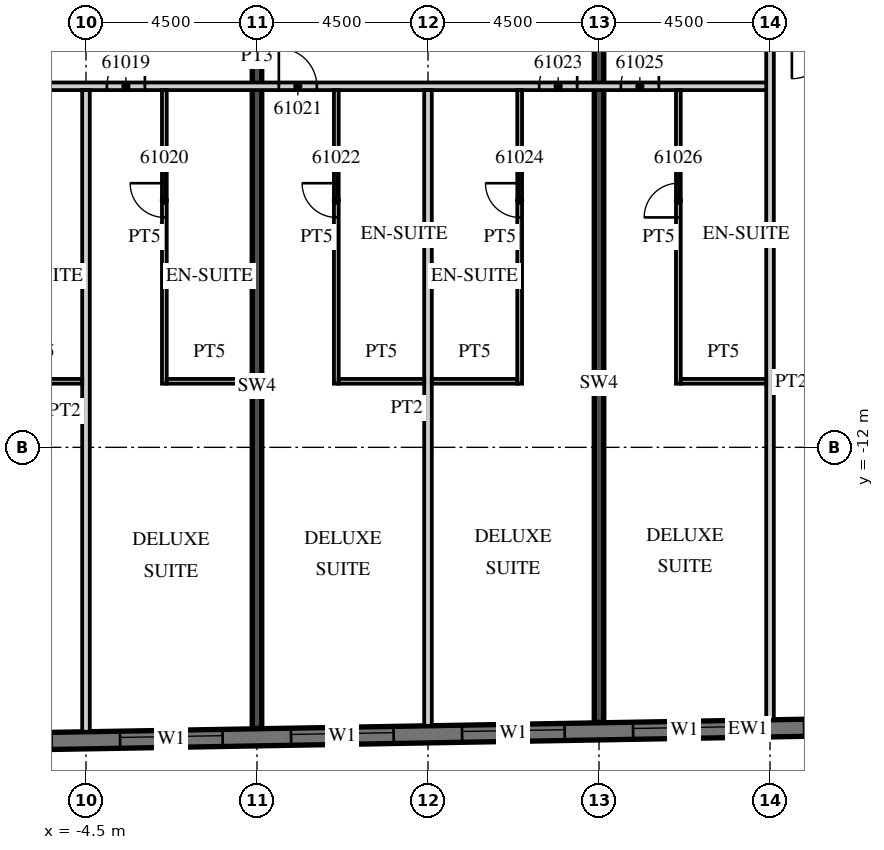
"""IFC4 building model, lengths in metres.
Left out: names, types, materials, properties, quantities, classifications, styles, units other than length and angle.
Written with IfcOpenShell. Run it as: python <this file> out.ifc"""

import sys

from ifc_helpers import new_model, si_unit, direction, frame, frame_2d, origin, place, context, subcontext, project, spatial, rectangle, extrude, element, fill, save


model = new_model("IFC4")
c1 = context("Model", 3, precision=1e-05, world=origin(), true_north=direction((0.0, 1.0)))
c2 = subcontext(c1, "Body", "Model", "MODEL_VIEW")
j1 = project(units=[si_unit("LENGTHUNIT", "METRE"), si_unit("PLANEANGLEUNIT", "RADIAN")], contexts=[c1])
p1 = place(None, origin())
s1 = spatial("IfcSite", under=j1, at=p1, CompositionType="ELEMENT")
p2 = place(p1, origin())
s2 = spatial("IfcBuilding", under=s1, at=p2, CompositionType="ELEMENT")
p3 = place(p2, frame((0.0, 0.0, 247.4)))
s3 = spatial("IfcBuildingStorey", under=s2, at=p3, CompositionType="ELEMENT", Elevation=247.4)
p4 = place(p3, frame((0.0, -19.393, 0.0), z_axis=(0.0, 0.0, 1.0), x_axis=(0.0, 1.0, 0.0)))
e1 = element("IfcWall", 1, at=p4, inside=s3, PredefinedType="SHEAR", context=c2, shape_type="SweptSolid", body=[
    extrude(rectangle(XDim=17.993, YDim=0.25, at=frame_2d((8.997, 0.0))), origin(), (0.0, 0.0, 1.0), 3.3),
])
p5 = place(p3, frame((9.0, -19.236, 0.0), z_axis=(0.0, 0.0, 1.0), x_axis=(0.0, 1.0, 0.0)))
e2 = element("IfcWall", 2, at=p5, inside=s3, PredefinedType="SHEAR", context=c2, shape_type="SweptSolid", body=[
    extrude(rectangle(XDim=17.836, YDim=0.25, at=frame_2d((8.918, 0.0))), origin(), (0.0, 0.0, 1.0), 3.3),
])
p6 = place(p3, frame((-13.504, -19.866, 0.0), z_axis=(0.0, 0.0, 1.0), x_axis=(0.999847672978, 0.017453676992, 0.0)))
e3 = element("IfcWall", 3, at=p6, inside=s3, PredefinedType="SOLIDWALL", context=c2, shape_type="SweptSolid", body=[
    extrude(rectangle(XDim=52.86, YDim=0.45, at=frame_2d((26.43, 0.0))), origin(), (0.0, 0.0, 1.0), 3.02),
])
p7 = place(p6, frame((0.9, 0.0, 0.45)))
e4 = element("IfcOpeningElement", 4, at=p7, cuts=e3, PredefinedType="OPENING", context=c2, shape_type="SweptSolid", body=[
    extrude(rectangle(XDim=2.7, YDim=2.25, at=frame_2d((1.35, 1.125))), frame((0.0, 0.235, 0.0), z_axis=(0.0, -1.0, 0.0), x_axis=(1.0, 0.0, 0.0)), (0.0, 0.0, 1.0), 0.47),
])
p8 = place(p6, frame((5.401, 0.0, 0.45)))
e5 = element("IfcOpeningElement", 5, at=p8, cuts=e3, PredefinedType="OPENING", context=c2, shape_type="SweptSolid", body=[
    extrude(rectangle(XDim=2.7, YDim=2.25, at=frame_2d((1.35, 1.125))), frame((0.0, 0.235, 0.0), z_axis=(0.0, -1.0, 0.0), x_axis=(1.0, 0.0, 0.0)), (0.0, 0.0, 1.0), 0.47),
])
p9 = place(p6, frame((9.902, 0.0, 0.45)))
e6 = element("IfcOpeningElement", 6, at=p9, cuts=e3, PredefinedType="OPENING", context=c2, shape_type="SweptSolid", body=[
    extrude(rectangle(XDim=2.7, YDim=2.25, at=frame_2d((1.35, 1.125))), frame((0.0, 0.235, 0.0), z_axis=(0.0, -1.0, 0.0), x_axis=(1.0, 0.0, 0.0)), (0.0, 0.0, 1.0), 0.47),
])
p10 = place(p6, frame((14.402, 0.0, 0.45)))
e7 = element("IfcOpeningElement", 7, at=p10, cuts=e3, PredefinedType="OPENING", context=c2, shape_type="SweptSolid", body=[
    extrude(rectangle(XDim=2.7, YDim=2.25, at=frame_2d((1.35, 1.125))), frame((0.0, 0.235, 0.0), z_axis=(0.0, -1.0, 0.0), x_axis=(1.0, 0.0, 0.0)), (0.0, 0.0, 1.0), 0.47),
])
p11 = place(p6, frame((18.903, 0.0, 0.45)))
e8 = element("IfcOpeningElement", 8, at=p11, cuts=e3, PredefinedType="OPENING", context=c2, shape_type="SweptSolid", body=[
    extrude(rectangle(XDim=2.7, YDim=2.25, at=frame_2d((1.35, 1.125))), frame((0.0, 0.235, 0.0), z_axis=(0.0, -1.0, 0.0), x_axis=(1.0, 0.0, 0.0)), (0.0, 0.0, 1.0), 0.47),
])
p12 = place(p6, frame((23.404, 0.0, 0.45)))
e9 = element("IfcOpeningElement", 9, at=p12, cuts=e3, PredefinedType="OPENING", context=c2, shape_type="SweptSolid", body=[
    extrude(rectangle(XDim=2.7, YDim=2.25, at=frame_2d((1.35, 1.125))), frame((0.0, 0.235, 0.0), z_axis=(0.0, -1.0, 0.0), x_axis=(1.0, 0.0, 0.0)), (0.0, 0.0, 1.0), 0.47),
])
p13 = place(p6, frame((27.904, 0.0, 0.45)))
e10 = element("IfcOpeningElement", 10, at=p13, cuts=e3, PredefinedType="OPENING", context=c2, shape_type="SweptSolid", body=[
    extrude(rectangle(XDim=2.7, YDim=2.25, at=frame_2d((1.35, 1.125))), frame((0.0, 0.235, 0.0), z_axis=(0.0, -1.0, 0.0), x_axis=(1.0, 0.0, 0.0)), (0.0, 0.0, 1.0), 0.47),
])
p14 = place(p6, frame((32.405, 0.0, 0.45)))
e11 = element("IfcOpeningElement", 11, at=p14, cuts=e3, PredefinedType="OPENING", context=c2, shape_type="SweptSolid", body=[
    extrude(rectangle(XDim=2.7, YDim=2.25, at=frame_2d((1.35, 1.125))), frame((0.0, 0.235, 0.0), z_axis=(0.0, -1.0, 0.0), x_axis=(1.0, 0.0, 0.0)), (0.0, 0.0, 1.0), 0.47),
])
p15 = place(p6, frame((36.906, 0.0, 0.45)))
e12 = element("IfcOpeningElement", 12, at=p15, cuts=e3, PredefinedType="OPENING", context=c2, shape_type="SweptSolid", body=[
    extrude(rectangle(XDim=2.7, YDim=2.25, at=frame_2d((1.35, 1.125))), frame((0.0, 0.235, 0.0), z_axis=(0.0, -1.0, 0.0), x_axis=(1.0, 0.0, 0.0)), (0.0, 0.0, 1.0), 0.47),
])
p16 = place(p6, frame((41.406, 0.0, 0.45)))
e13 = element("IfcOpeningElement", 13, at=p16, cuts=e3, PredefinedType="OPENING", context=c2, shape_type="SweptSolid", body=[
    extrude(rectangle(XDim=2.7, YDim=2.25, at=frame_2d((1.35, 1.125))), frame((0.0, 0.235, 0.0), z_axis=(0.0, -1.0, 0.0), x_axis=(1.0, 0.0, 0.0)), (0.0, 0.0, 1.0), 0.47),
])
p17 = place(p6, frame((45.907, 0.0, 0.45)))
e14 = element("IfcOpeningElement", 14, at=p17, cuts=e3, PredefinedType="OPENING", context=c2, shape_type="SweptSolid", body=[
    extrude(rectangle(XDim=2.7, YDim=2.25, at=frame_2d((1.35, 1.125))), frame((0.0, 0.235, 0.0), z_axis=(0.0, -1.0, 0.0), x_axis=(1.0, 0.0, 0.0)), (0.0, 0.0, 1.0), 0.47),
])
p18 = place(p3, frame((-13.5, -2.5, 0.0), z_axis=(0.0, 0.0, 1.0), x_axis=(1.0, 0.0, 0.0)))
e15 = element("IfcWall", 15, at=p18, inside=s3, PredefinedType="PARTITIONING", context=c2, shape_type="SweptSolid", body=[
    extrude(rectangle(XDim=27.0, YDim=0.2, at=frame_2d((13.5, 0.0))), origin(), (0.0, 0.0, 1.0), 3.02),
])
p19 = place(p18, frame((2.925, 0.0, 0.0)))
e16 = element("IfcOpeningElement", 16, at=p19, cuts=e15, PredefinedType="OPENING", context=c2, shape_type="SweptSolid", body=[
    extrude(rectangle(XDim=1.0, YDim=2.1, at=frame_2d((0.5, 1.05))), frame((0.0, 0.11, 0.0), z_axis=(0.0, -1.0, 0.0), x_axis=(1.0, 0.0, 0.0)), (0.0, 0.0, 1.0), 0.22),
])
p20 = place(p18, frame((5.075, 0.0, 0.0)))
e17 = element("IfcOpeningElement", 17, at=p20, cuts=e15, PredefinedType="OPENING", context=c2, shape_type="SweptSolid", body=[
    extrude(rectangle(XDim=1.0, YDim=2.1, at=frame_2d((0.5, 1.05))), frame((0.0, 0.11, 0.0), z_axis=(0.0, -1.0, 0.0), x_axis=(1.0, 0.0, 0.0)), (0.0, 0.0, 1.0), 0.22),
])
p21 = place(p18, frame((9.55, 0.0, 0.0)))
e18 = element("IfcOpeningElement", 18, at=p21, cuts=e15, PredefinedType="OPENING", context=c2, shape_type="SweptSolid", body=[
    extrude(rectangle(XDim=1.0, YDim=2.1, at=frame_2d((0.5, 1.05))), frame((0.0, 0.11, 0.0), z_axis=(0.0, -1.0, 0.0), x_axis=(1.0, 0.0, 0.0)), (0.0, 0.0, 1.0), 0.22),
])
p22 = place(p18, frame((14.075, 0.0, 0.0)))
e19 = element("IfcOpeningElement", 19, at=p22, cuts=e15, PredefinedType="OPENING", context=c2, shape_type="SweptSolid", body=[
    extrude(rectangle(XDim=1.0, YDim=2.1, at=frame_2d((0.5, 1.05))), frame((0.0, 0.11, 0.0), z_axis=(0.0, -1.0, 0.0), x_axis=(1.0, 0.0, 0.0)), (0.0, 0.0, 1.0), 0.22),
])
p23 = place(p18, frame((20.925, 0.0, 0.0)))
e20 = element("IfcOpeningElement", 20, at=p23, cuts=e15, PredefinedType="OPENING", context=c2, shape_type="SweptSolid", body=[
    extrude(rectangle(XDim=1.0, YDim=2.1, at=frame_2d((0.5, 1.05))), frame((0.0, 0.11, 0.0), z_axis=(0.0, -1.0, 0.0), x_axis=(1.0, 0.0, 0.0)), (0.0, 0.0, 1.0), 0.22),
])
p24 = place(p18, frame((23.075, 0.0, 0.0)))
e21 = element("IfcOpeningElement", 21, at=p24, cuts=e15, PredefinedType="OPENING", context=c2, shape_type="SweptSolid", body=[
    extrude(rectangle(XDim=1.0, YDim=2.1, at=frame_2d((0.5, 1.05))), frame((0.0, 0.11, 0.0), z_axis=(0.0, -1.0, 0.0), x_axis=(1.0, 0.0, 0.0)), (0.0, 0.0, 1.0), 0.22),
])
p25 = place(p3, frame((-4.5, -19.484, 0.0), z_axis=(0.0, 0.0, 1.0), x_axis=(0.0, 1.0, 0.0)))
e22 = element("IfcWall", 22, at=p25, inside=s3, PredefinedType="PARTITIONING", context=c2, shape_type="SweptSolid", body=[
    extrude(rectangle(XDim=16.884, YDim=0.2, at=frame_2d((8.442, 0.0))), origin(), (0.0, 0.0, 1.0), 3.02),
])
p26 = place(p3, frame((-6.85, -10.262, 0.0), z_axis=(0.0, 0.0, 1.0), x_axis=(1.0, 0.0, 0.0)))
e23 = element("IfcWall", 23, at=p26, inside=s3, PredefinedType="PARTITIONING", context=c2, shape_type="SweptSolid", body=[
    extrude(rectangle(XDim=2.25, YDim=0.125, at=frame_2d((1.125, 0.0))), origin(), (0.0, 0.0, 1.0), 3.02),
])
p27 = place(p3, frame((-2.438, -10.325, 0.0), z_axis=(0.0, 0.0, 1.0), x_axis=(0.0, 1.0, 0.0)))
e24 = element("IfcWall", 24, at=p27, inside=s3, PredefinedType="PARTITIONING", context=c2, shape_type="SweptSolid", body=[
    extrude(rectangle(XDim=7.725, YDim=0.125, at=frame_2d((3.862, 0.0))), origin(), (0.0, 0.0, 1.0), 3.02),
])
p28 = place(p27, frame((4.375, 0.0, 0.0)))
e25 = element("IfcOpeningElement", 25, at=p28, cuts=e24, PredefinedType="OPENING", context=c2, shape_type="SweptSolid", body=[
    extrude(rectangle(XDim=0.9, YDim=2.1, at=frame_2d((0.45, 1.05))), frame((0.0, 0.073, 0.0), z_axis=(0.0, -1.0, 0.0), x_axis=(1.0, 0.0, 0.0)), (0.0, 0.0, 1.0), 0.145),
])
p29 = place(p3, frame((-2.375, -10.262, 0.0), z_axis=(0.0, 0.0, 1.0), x_axis=(1.0, 0.0, 0.0)))
e26 = element("IfcWall", 26, at=p29, inside=s3, PredefinedType="PARTITIONING", context=c2, shape_type="SweptSolid", body=[
    extrude(rectangle(XDim=2.25, YDim=0.125, at=frame_2d((1.125, 0.0))), origin(), (0.0, 0.0, 1.0), 3.02),
])
p30 = place(p3, frame((4.5, -19.327, 0.0), z_axis=(0.0, 0.0, 1.0), x_axis=(0.0, 1.0, 0.0)))
e27 = element("IfcWall", 27, at=p30, inside=s3, PredefinedType="PARTITIONING", context=c2, shape_type="SweptSolid", body=[
    extrude(rectangle(XDim=16.727, YDim=0.2, at=frame_2d((8.363, 0.0))), origin(), (0.0, 0.0, 1.0), 3.02),
])
p31 = place(p3, frame((2.087, -10.325, 0.0), z_axis=(0.0, 0.0, 1.0), x_axis=(0.0, 1.0, 0.0)))
e28 = element("IfcWall", 28, at=p31, inside=s3, PredefinedType="PARTITIONING", context=c2, shape_type="SweptSolid", body=[
    extrude(rectangle(XDim=7.725, YDim=0.125, at=frame_2d((3.862, 0.0))), origin(), (0.0, 0.0, 1.0), 3.02),
])
p32 = place(p31, frame((4.375, 0.0, 0.0)))
e29 = element("IfcOpeningElement", 29, at=p32, cuts=e28, PredefinedType="OPENING", context=c2, shape_type="SweptSolid", body=[
    extrude(rectangle(XDim=0.9, YDim=2.1, at=frame_2d((0.45, 1.05))), frame((0.0, 0.073, 0.0), z_axis=(0.0, -1.0, 0.0), x_axis=(1.0, 0.0, 0.0)), (0.0, 0.0, 1.0), 0.145),
])
p33 = place(p3, frame((2.15, -10.262, 0.0), z_axis=(0.0, 0.0, 1.0), x_axis=(1.0, 0.0, 0.0)))
e30 = element("IfcWall", 30, at=p33, inside=s3, PredefinedType="PARTITIONING", context=c2, shape_type="SweptSolid", body=[
    extrude(rectangle(XDim=2.25, YDim=0.125, at=frame_2d((1.125, 0.0))), origin(), (0.0, 0.0, 1.0), 3.02),
])
p34 = place(p3, frame((6.912, -10.325, 0.0), z_axis=(0.0, 0.0, 1.0), x_axis=(0.0, 1.0, 0.0)))
e31 = element("IfcWall", 31, at=p34, inside=s3, PredefinedType="PARTITIONING", context=c2, shape_type="SweptSolid", body=[
    extrude(rectangle(XDim=7.725, YDim=0.125, at=frame_2d((3.862, 0.0))), origin(), (0.0, 0.0, 1.0), 3.02),
])
p35 = place(p34, frame((4.375, 0.0, 0.0)))
e32 = element("IfcOpeningElement", 32, at=p35, cuts=e31, PredefinedType="OPENING", context=c2, shape_type="SweptSolid", body=[
    extrude(rectangle(XDim=0.9, YDim=2.1, at=frame_2d((0.45, 1.05))), frame((0.0, 0.073, 0.0), z_axis=(0.0, -1.0, 0.0), x_axis=(1.0, 0.0, 0.0)), (0.0, 0.0, 1.0), 0.145),
])
p36 = place(p3, frame((4.6, -10.262, 0.0), z_axis=(0.0, 0.0, 1.0), x_axis=(1.0, 0.0, 0.0)))
e33 = element("IfcWall", 33, at=p36, inside=s3, PredefinedType="PARTITIONING", context=c2, shape_type="SweptSolid", body=[
    extrude(rectangle(XDim=2.25, YDim=0.125, at=frame_2d((1.125, 0.0))), origin(), (0.0, 0.0, 1.0), 3.02),
])
p37 = place(p3, frame((13.5, -19.17, 0.0), z_axis=(0.0, 0.0, 1.0), x_axis=(0.0, 1.0, 0.0)))
e34 = element("IfcWall", 34, at=p37, inside=s3, PredefinedType="PARTITIONING", context=c2, shape_type="SweptSolid", body=[
    extrude(rectangle(XDim=17.77, YDim=0.2, at=frame_2d((8.885, 0.0))), origin(), (0.0, 0.0, 1.0), 3.02),
])
p38 = place(p3, frame((11.088, -10.325, 0.0), z_axis=(0.0, 0.0, 1.0), x_axis=(0.0, 1.0, 0.0)))
e35 = element("IfcWall", 35, at=p38, inside=s3, PredefinedType="PARTITIONING", context=c2, shape_type="SweptSolid", body=[
    extrude(rectangle(XDim=7.725, YDim=0.125, at=frame_2d((3.862, 0.0))), origin(), (0.0, 0.0, 1.0), 3.02),
])
p39 = place(p38, frame((4.375, 0.0, 0.0)))
e36 = element("IfcOpeningElement", 36, at=p39, cuts=e35, PredefinedType="OPENING", context=c2, shape_type="SweptSolid", body=[
    extrude(rectangle(XDim=0.9, YDim=2.1, at=frame_2d((0.45, 1.05))), frame((0.0, 0.073, 0.0), z_axis=(0.0, -1.0, 0.0), x_axis=(1.0, 0.0, 0.0)), (0.0, 0.0, 1.0), 0.145),
])
p40 = place(p3, frame((11.15, -10.262, 0.0), z_axis=(0.0, 0.0, 1.0), x_axis=(1.0, 0.0, 0.0)))
e37 = element("IfcWall", 37, at=p40, inside=s3, PredefinedType="PARTITIONING", context=c2, shape_type="SweptSolid", body=[
    extrude(rectangle(XDim=2.25, YDim=0.125, at=frame_2d((1.125, 0.0))), origin(), (0.0, 0.0, 1.0), 3.02),
])
p41 = place(p9, origin())
e38 = element("IfcWindow", 38, at=p41, inside=s3, PartitioningType="SINGLE_PANEL", PredefinedType="WINDOW", context=c2, shape_type="SweptSolid", body=[
    extrude(rectangle(XDim=2.7, YDim=2.25, at=frame_2d((1.35, 1.125))), frame((0.0, 0.09, 0.0), z_axis=(0.0, -1.0, 0.0), x_axis=(1.0, 0.0, 0.0)), (0.0, 0.0, 1.0), 0.06),
])
fill(e6, e38)
p42 = place(p10, origin())
e39 = element("IfcWindow", 39, at=p42, inside=s3, PartitioningType="SINGLE_PANEL", PredefinedType="WINDOW", context=c2, shape_type="SweptSolid", body=[
    extrude(rectangle(XDim=2.7, YDim=2.25, at=frame_2d((1.35, 1.125))), frame((0.0, 0.09, 0.0), z_axis=(0.0, -1.0, 0.0), x_axis=(1.0, 0.0, 0.0)), (0.0, 0.0, 1.0), 0.06),
])
fill(e7, e39)
p43 = place(p11, origin())
e40 = element("IfcWindow", 40, at=p43, inside=s3, PartitioningType="SINGLE_PANEL", PredefinedType="WINDOW", context=c2, shape_type="SweptSolid", body=[
    extrude(rectangle(XDim=2.7, YDim=2.25, at=frame_2d((1.35, 1.125))), frame((0.0, 0.09, 0.0), z_axis=(0.0, -1.0, 0.0), x_axis=(1.0, 0.0, 0.0)), (0.0, 0.0, 1.0), 0.06),
])
fill(e8, e40)
p44 = place(p12, origin())
e41 = element("IfcWindow", 41, at=p44, inside=s3, PartitioningType="SINGLE_PANEL", PredefinedType="WINDOW", context=c2, shape_type="SweptSolid", body=[
    extrude(rectangle(XDim=2.7, YDim=2.25, at=frame_2d((1.35, 1.125))), frame((0.0, 0.09, 0.0), z_axis=(0.0, -1.0, 0.0), x_axis=(1.0, 0.0, 0.0)), (0.0, 0.0, 1.0), 0.06),
])
fill(e9, e41)
p45 = place(p13, origin())
e42 = element("IfcWindow", 42, at=p45, inside=s3, PartitioningType="SINGLE_PANEL", PredefinedType="WINDOW", context=c2, shape_type="SweptSolid", body=[
    extrude(rectangle(XDim=2.7, YDim=2.25, at=frame_2d((1.35, 1.125))), frame((0.0, 0.09, 0.0), z_axis=(0.0, -1.0, 0.0), x_axis=(1.0, 0.0, 0.0)), (0.0, 0.0, 1.0), 0.06),
])
fill(e10, e42)
p46 = place(p21, origin())
e43 = element("IfcDoor", 43, at=p46, inside=s3, OperationType="SINGLE_SWING_RIGHT", PredefinedType="DOOR", context=c2, shape_type="SweptSolid", body=[
    extrude(rectangle(XDim=1.0, YDim=2.1, at=frame_2d((0.5, 1.05))), frame((0.0, 0.025, 0.0), z_axis=(0.0, -1.0, 0.0), x_axis=(1.0, 0.0, 0.0)), (0.0, 0.0, 1.0), 0.05),
])
fill(e18, e43)
p47 = place(p28, origin())
e44 = element("IfcDoor", 44, at=p47, inside=s3, OperationType="SINGLE_SWING_RIGHT", PredefinedType="DOOR", context=c2, shape_type="SweptSolid", body=[
    extrude(rectangle(XDim=0.9, YDim=2.1, at=frame_2d((0.45, 1.05))), frame((0.0, 0.025, 0.0), z_axis=(0.0, -1.0, 0.0), x_axis=(1.0, 0.0, 0.0)), (0.0, 0.0, 1.0), 0.05),
])
fill(e25, e44)
p48 = place(p22, origin())
e45 = element("IfcDoor", 45, at=p48, inside=s3, OperationType="SINGLE_SWING_LEFT", PredefinedType="DOOR", context=c2, shape_type="SweptSolid", body=[
    extrude(rectangle(XDim=1.0, YDim=2.1, at=frame_2d((0.5, 1.05))), frame((0.0, 0.025, 0.0), z_axis=(0.0, -1.0, 0.0), x_axis=(1.0, 0.0, 0.0)), (0.0, 0.0, 1.0), 0.05),
])
fill(e19, e45)
p49 = place(p32, origin())
e46 = element("IfcDoor", 46, at=p49, inside=s3, OperationType="SINGLE_SWING_RIGHT", PredefinedType="DOOR", context=c2, shape_type="SweptSolid", body=[
    extrude(rectangle(XDim=0.9, YDim=2.1, at=frame_2d((0.45, 1.05))), frame((0.0, 0.025, 0.0), z_axis=(0.0, -1.0, 0.0), x_axis=(1.0, 0.0, 0.0)), (0.0, 0.0, 1.0), 0.05),
])
fill(e29, e46)
p50 = place(p23, origin())
e47 = element("IfcDoor", 47, at=p50, inside=s3, OperationType="SINGLE_SWING_RIGHT", PredefinedType="DOOR", context=c2, shape_type="SweptSolid", body=[
    extrude(rectangle(XDim=1.0, YDim=2.1, at=frame_2d((0.5, 1.05))), frame((0.0, 0.025, 0.0), z_axis=(0.0, -1.0, 0.0), x_axis=(1.0, 0.0, 0.0)), (0.0, 0.0, 1.0), 0.05),
])
fill(e20, e47)
p51 = place(p35, origin())
e48 = element("IfcDoor", 48, at=p51, inside=s3, OperationType="SINGLE_SWING_RIGHT", PredefinedType="DOOR", context=c2, shape_type="SweptSolid", body=[
    extrude(rectangle(XDim=0.9, YDim=2.1, at=frame_2d((0.45, 1.05))), frame((0.0, 0.025, 0.0), z_axis=(0.0, -1.0, 0.0), x_axis=(1.0, 0.0, 0.0)), (0.0, 0.0, 1.0), 0.05),
])
fill(e32, e48)
p52 = place(p24, origin())
e49 = element("IfcDoor", 49, at=p52, inside=s3, OperationType="SINGLE_SWING_RIGHT", PredefinedType="DOOR", context=c2, shape_type="SweptSolid", body=[
    extrude(rectangle(XDim=1.0, YDim=2.1, at=frame_2d((0.5, 1.05))), frame((0.0, 0.025, 0.0), z_axis=(0.0, -1.0, 0.0), x_axis=(1.0, 0.0, 0.0)), (0.0, 0.0, 1.0), 0.05),
])
fill(e21, e49)
p53 = place(p39, origin())
e50 = element("IfcDoor", 50, at=p53, inside=s3, OperationType="SINGLE_SWING_LEFT", PredefinedType="DOOR", context=c2, shape_type="SweptSolid", body=[
    extrude(rectangle(XDim=0.9, YDim=2.1, at=frame_2d((0.45, 1.05))), frame((0.0, 0.025, 0.0), z_axis=(0.0, -1.0, 0.0), x_axis=(1.0, 0.0, 0.0)), (0.0, 0.0, 1.0), 0.05),
])
fill(e36, e50)
save(model, sys.argv[1])
